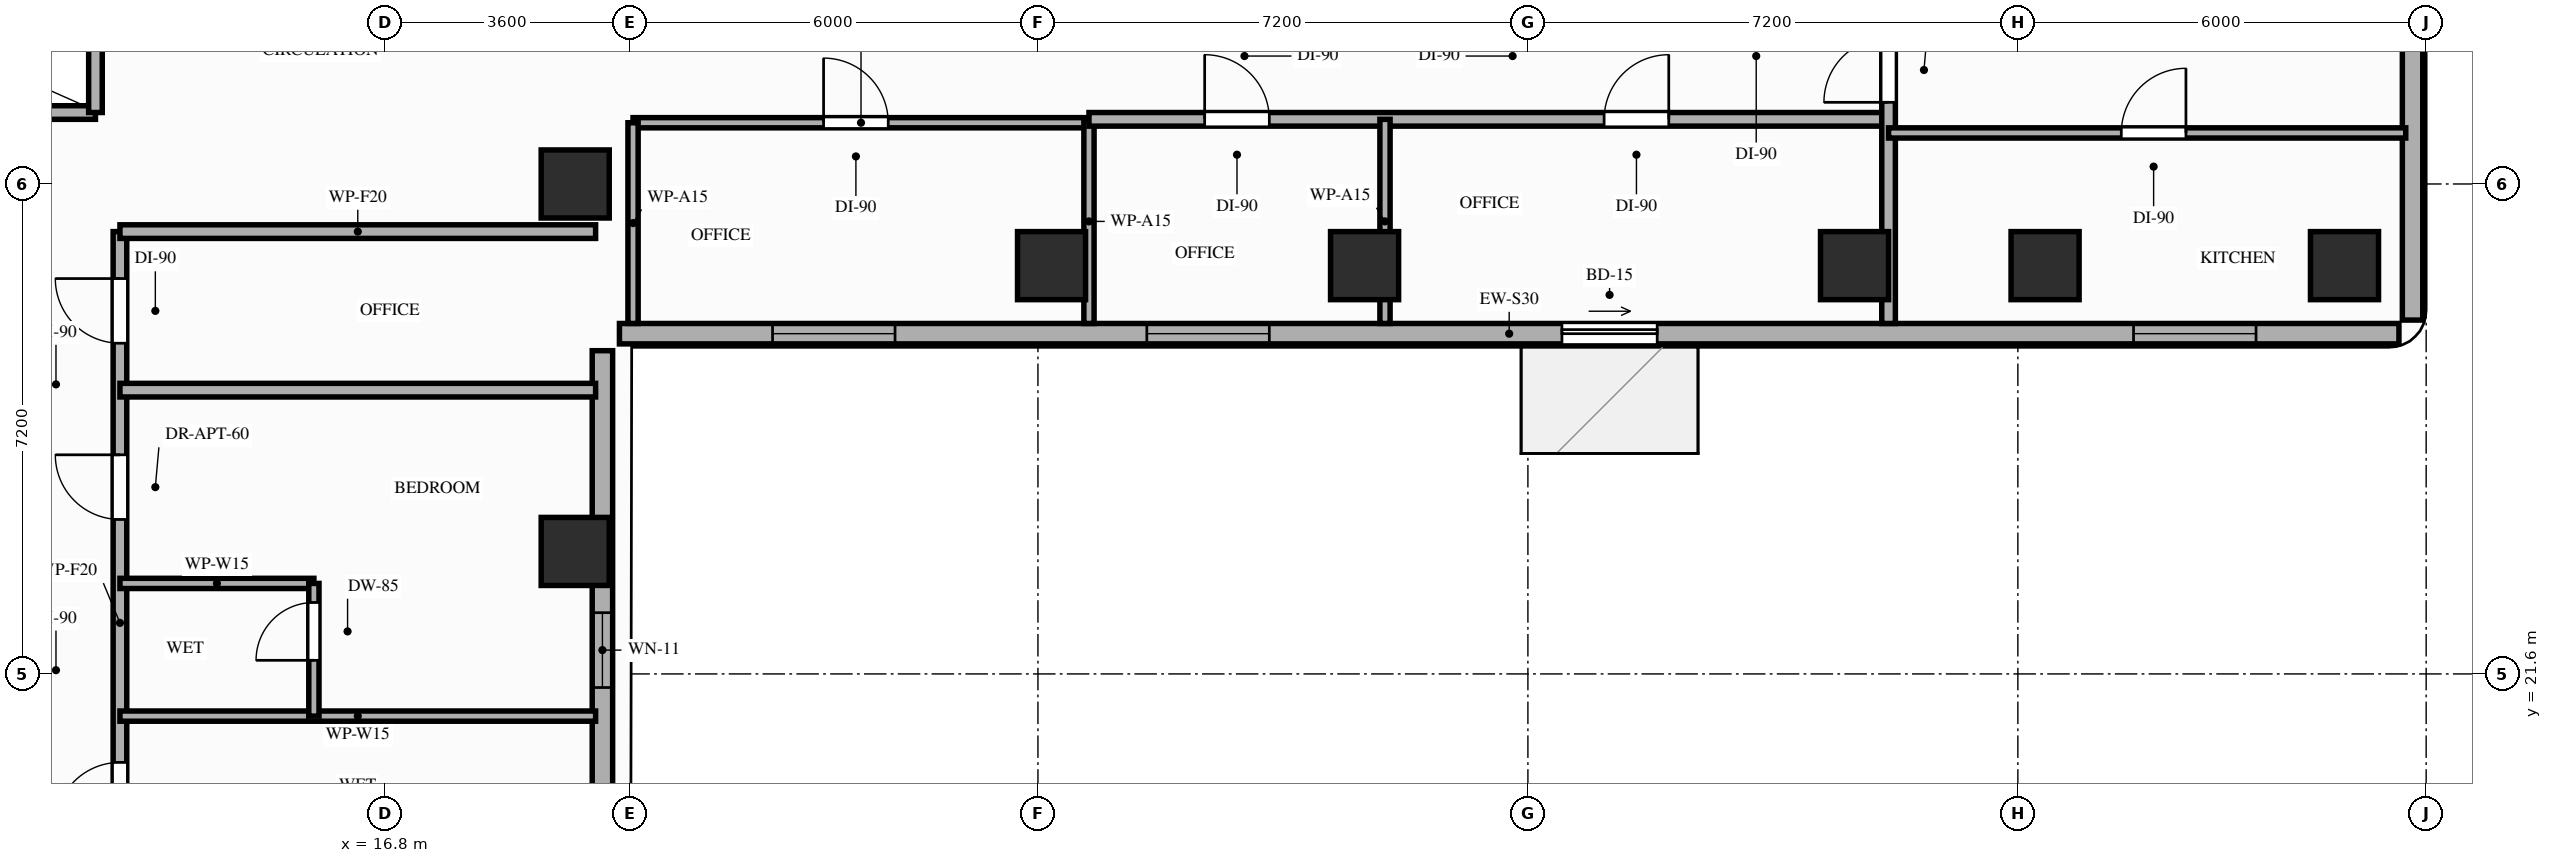
"""IFC4 building model, lengths in metres.
Left out: names, types, materials, properties, quantities, classifications, styles, units other than length and angle.
Written with IfcOpenShell. Run it as: python <this file> out.ifc"""

import sys

from ifc_helpers import new_model, si_unit, direction, frame, frame_2d, origin, origin_2d, place, context, subcontext, project, spatial, rectangle, extrude, element, fill, save


model = new_model("IFC4")
c1 = context("Model", 3, precision=1e-05, world=origin(), true_north=direction((0.0, 1.0)))
c2 = subcontext(c1, "Body", "Model", "MODEL_VIEW")
j1 = project(units=[si_unit("LENGTHUNIT", "METRE"), si_unit("PLANEANGLEUNIT", "RADIAN")], contexts=[c1])
p1 = place(None, origin())
s1 = spatial("IfcSite", under=j1, at=p1, CompositionType="ELEMENT")
p2 = place(p1, origin())
s2 = spatial("IfcBuilding", under=s1, at=p2, CompositionType="ELEMENT")
p3 = place(p2, frame((0.0, 0.0, 145.8)))
s3 = spatial("IfcBuildingStorey", under=s2, at=p3, CompositionType="ELEMENT", Elevation=145.8)
for number, where, z_axis, x_axis in (
    (1, (19.6, 23.4, 0.0), (0.0, 0.0, 1.0), (1.0, 0.0, 0.0)),
    (2, (19.6, 28.8, 0.0), (0.0, 0.0, 1.0), (1.0, 0.0, 0.0)),
    (3, (26.6, 27.6, 0.0), (0.0, 0.0, 1.0), (1.0, 0.0, 0.0)),
    (4, (31.2, 27.6, 0.0), (0.0, 0.0, 1.0), (1.0, 0.0, 0.0)),
    (5, (38.4, 27.6, 0.0), (0.0, 0.0, 1.0), (1.0, 0.0, 0.0)),
    (6, (41.2, 27.6, 0.0), (0.0, 0.0, 1.0), (1.0, 0.0, 0.0)),
    (7, (45.6, 27.6, 0.0), (0.0, 0.0, 1.0), (1.0, 0.0, 0.0)),
):
    element("IfcColumn", number, at=place(p3, frame(where, z_axis=z_axis, x_axis=x_axis)), inside=s3, PredefinedType="COLUMN", context=c2, shape_type="SweptSolid", body=[
        extrude(rectangle(XDim=1.0, YDim=1.0, at=origin_2d()), origin(), (0.0, 0.0, 1.0), 3.2),
    ])
p4 = place(p3, frame((20.0, 8.8, 0.0), z_axis=(0.0, 0.0, 1.0), x_axis=(0.0, 1.0, 0.0)))
e8 = element("IfcWall", 8, at=p4, inside=s3, PredefinedType="STANDARD", context=c2, shape_type="SweptSolid", body=[
    extrude(rectangle(XDim=17.55, YDim=0.3, at=frame_2d((8.775, 0.0))), origin(), (0.0, 0.0, 1.0), 2.45),
])
p5 = place(p4, frame((12.6, 0.0, 0.85)))
e9 = element("IfcOpeningElement", 9, at=p5, cuts=e8, PredefinedType="OPENING", context=c2, shape_type="SweptSolid", body=[
    extrude(rectangle(XDim=1.1, YDim=1.35, at=frame_2d((0.55, 0.675))), frame((0.0, 0.16, 0.0), z_axis=(0.0, -1.0, 0.0), x_axis=(1.0, 0.0, 0.0)), (0.0, 0.0, 1.0), 0.32),
])
p6 = place(p4, frame((5.6, 0.0, 0.85)))
e10 = element("IfcOpeningElement", 10, at=p6, cuts=e8, PredefinedType="OPENING", context=c2, shape_type="SweptSolid", body=[
    extrude(rectangle(XDim=1.8, YDim=1.35, at=frame_2d((0.9, 0.675))), frame((0.0, 0.16, 0.0), z_axis=(0.0, -1.0, 0.0), x_axis=(1.0, 0.0, 0.0)), (0.0, 0.0, 1.0), 0.32),
])
p7 = place(p3, frame((20.25, 26.6, 0.0), z_axis=(0.0, 0.0, 1.0), x_axis=(1.0, 0.0, 0.0)))
e11 = element("IfcWall", 11, at=p7, inside=s3, PredefinedType="STANDARD", context=c2, shape_type="SweptSolid", body=[
    extrude(rectangle(XDim=26.15, YDim=0.3, at=frame_2d((13.075, 0.0))), origin(), (0.0, 0.0, 1.0), 2.71),
])
p8 = place(p7, frame((13.85, 0.0, 0.0)))
e12 = element("IfcOpeningElement", 12, at=p8, cuts=e11, PredefinedType="OPENING", context=c2, shape_type="SweptSolid", body=[
    extrude(rectangle(XDim=1.4, YDim=2.1, at=frame_2d((0.7, 1.05))), frame((0.0, 0.16, 0.0), z_axis=(0.0, -1.0, 0.0), x_axis=(1.0, 0.0, 0.0)), (0.0, 0.0, 1.0), 0.32),
])
p9 = place(p7, frame((2.25, 0.0, 0.85)))
e13 = element("IfcOpeningElement", 13, at=p9, cuts=e11, PredefinedType="OPENING", context=c2, shape_type="SweptSolid", body=[
    extrude(rectangle(XDim=1.8, YDim=1.61, at=frame_2d((0.9, 0.805))), frame((0.0, 0.16, 0.0), z_axis=(0.0, -1.0, 0.0), x_axis=(1.0, 0.0, 0.0)), (0.0, 0.0, 1.0), 0.32),
])
p10 = place(p7, frame((7.75, 0.0, 0.85)))
e14 = element("IfcOpeningElement", 14, at=p10, cuts=e11, PredefinedType="OPENING", context=c2, shape_type="SweptSolid", body=[
    extrude(rectangle(XDim=1.8, YDim=1.61, at=frame_2d((0.9, 0.805))), frame((0.0, 0.16, 0.0), z_axis=(0.0, -1.0, 0.0), x_axis=(1.0, 0.0, 0.0)), (0.0, 0.0, 1.0), 0.32),
])
p11 = place(p7, frame((22.25, 0.0, 0.85)))
e15 = element("IfcOpeningElement", 15, at=p11, cuts=e11, PredefinedType="OPENING", context=c2, shape_type="SweptSolid", body=[
    extrude(rectangle(XDim=1.8, YDim=1.61, at=frame_2d((0.9, 0.805))), frame((0.0, 0.16, 0.0), z_axis=(0.0, -1.0, 0.0), x_axis=(1.0, 0.0, 0.0)), (0.0, 0.0, 1.0), 0.32),
])
p12 = place(p3, frame((46.6, 26.8, 0.0), z_axis=(0.0, 0.0, 1.0), x_axis=(0.0, 1.0, 0.0)))
e16 = element("IfcWall", 16, at=p12, inside=s3, PredefinedType="STANDARD", context=c2, shape_type="SweptSolid", body=[
    extrude(rectangle(XDim=15.35, YDim=0.3, at=frame_2d((7.675, 0.0))), origin(), (0.0, 0.0, 1.0), 3.02),
])
p13 = place(p12, frame((6.13, 0.0, 0.85)))
e17 = element("IfcOpeningElement", 17, at=p13, cuts=e16, PredefinedType="OPENING", context=c2, shape_type="SweptSolid", body=[
    extrude(rectangle(XDim=1.8, YDim=1.75, at=frame_2d((0.9, 0.875))), frame((0.0, 0.16, 0.0), z_axis=(0.0, -1.0, 0.0), x_axis=(1.0, 0.0, 0.0)), (0.0, 0.0, 1.0), 0.32),
])
p14 = place(p3, frame((7.0, 29.85, 0.0), z_axis=(0.0, 0.0, 1.0), x_axis=(1.0, 0.0, 0.0)))
e18 = element("IfcWall", 18, at=p14, inside=s3, PredefinedType="MOVABLE", context=c2, shape_type="SweptSolid", body=[
    extrude(rectangle(XDim=5.55, YDim=0.2, at=frame_2d((2.775, 0.0))), origin(), (0.0, 0.0, 1.0), 3.02),
])
p15 = place(p3, frame((12.55, 29.85, 0.0), z_axis=(0.0, 0.0, 1.0), x_axis=(0.0, 1.0, 0.0)))
e19 = element("IfcWall", 19, at=p15, inside=s3, PredefinedType="MOVABLE", context=c2, shape_type="SweptSolid", body=[
    extrude(rectangle(XDim=2.5, YDim=0.2, at=frame_2d((1.25, 0.0))), origin(), (0.0, 0.0, 1.0), 3.02),
])
p16 = place(p3, frame((12.91, 16.6, 0.0), z_axis=(0.0, 0.0, 1.0), x_axis=(0.0, 1.0, 0.0)))
e20 = element("IfcWall", 20, at=p16, inside=s3, PredefinedType="PARTITIONING", context=c2, shape_type="SweptSolid", body=[
    extrude(rectangle(XDim=11.5, YDim=0.2, at=frame_2d((5.75, 0.0))), origin(), (0.0, 0.0, 1.0), 2.45),
])
p17 = place(p16, frame((0.45, 0.0, 0.0)))
e21 = element("IfcOpeningElement", 21, at=p17, cuts=e20, PredefinedType="OPENING", context=c2, shape_type="SweptSolid", body=[
    extrude(rectangle(XDim=0.95, YDim=2.15, at=frame_2d((0.475, 1.075))), frame((0.0, 0.11, 0.0), z_axis=(0.0, -1.0, 0.0), x_axis=(1.0, 0.0, 0.0)), (0.0, 0.0, 1.0), 0.22),
])
p18 = place(p16, frame((2.75, 0.0, 0.0)))
e22 = element("IfcOpeningElement", 22, at=p18, cuts=e20, PredefinedType="OPENING", context=c2, shape_type="SweptSolid", body=[
    extrude(rectangle(XDim=0.95, YDim=2.1, at=frame_2d((0.475, 1.05))), frame((0.0, 0.11, 0.0), z_axis=(0.0, -1.0, 0.0), x_axis=(1.0, 0.0, 0.0)), (0.0, 0.0, 1.0), 0.22),
])
p19 = place(p16, frame((9.86, 0.0, 0.0)))
e23 = element("IfcOpeningElement", 23, at=p19, cuts=e20, PredefinedType="OPENING", context=c2, shape_type="SweptSolid", body=[
    extrude(rectangle(XDim=0.95, YDim=2.15, at=frame_2d((0.475, 1.075))), frame((0.0, 0.11, 0.0), z_axis=(0.0, -1.0, 0.0), x_axis=(1.0, 0.0, 0.0)), (0.0, 0.0, 1.0), 0.22),
])
p20 = place(p16, frame((7.27, 0.0, 0.0)))
e24 = element("IfcOpeningElement", 24, at=p20, cuts=e20, PredefinedType="OPENING", context=c2, shape_type="SweptSolid", body=[
    extrude(rectangle(XDim=0.95, YDim=2.15, at=frame_2d((0.475, 1.075))), frame((0.0, 0.11, 0.0), z_axis=(0.0, -1.0, 0.0), x_axis=(1.0, 0.0, 0.0)), (0.0, 0.0, 1.0), 0.22),
])
p21 = place(p3, frame((12.91, 28.1, 0.0), z_axis=(0.0, 0.0, 1.0), x_axis=(1.0, 0.0, 0.0)))
e25 = element("IfcWall", 25, at=p21, inside=s3, PredefinedType="PARTITIONING", context=c2, shape_type="SweptSolid", body=[
    extrude(rectangle(XDim=6.99, YDim=0.2, at=frame_2d((3.495, 0.0))), origin(), (0.0, 0.0, 1.0), 2.45),
])
p22 = place(p3, frame((20.45, 29.7, 0.0), z_axis=(0.0, 0.0, 1.0), x_axis=(1.0, 0.0, 0.0)))
e26 = element("IfcWall", 26, at=p22, inside=s3, PredefinedType="PARTITIONING", context=c2, shape_type="SweptSolid", body=[
    extrude(rectangle(XDim=6.7, YDim=0.15, at=frame_2d((3.35, 0.0))), origin(), (0.0, 0.0, 1.0), 3.02),
])
p23 = place(p22, frame((2.8, 0.0, 0.0)))
e27 = element("IfcOpeningElement", 27, at=p23, cuts=e26, PredefinedType="OPENING", context=c2, shape_type="SweptSolid", body=[
    extrude(rectangle(XDim=0.95, YDim=2.15, at=frame_2d((0.475, 1.075))), frame((0.0, 0.085, 0.0), z_axis=(0.0, -1.0, 0.0), x_axis=(1.0, 0.0, 0.0)), (0.0, 0.0, 1.0), 0.17),
])
p24 = place(p3, frame((20.45, 26.75, 0.0), z_axis=(0.0, 0.0, 1.0), x_axis=(0.0, 1.0, 0.0)))
e28 = element("IfcWall", 28, at=p24, inside=s3, PredefinedType="PARTITIONING", context=c2, shape_type="SweptSolid", body=[
    extrude(rectangle(XDim=2.95, YDim=0.15, at=frame_2d((1.475, 0.0))), origin(), (0.0, 0.0, 1.0), 2.45),
])
p25 = place(p3, frame((27.15, 26.75, 0.0), z_axis=(0.0, 0.0, 1.0), x_axis=(0.0, 1.0, 0.0)))
e29 = element("IfcWall", 29, at=p25, inside=s3, PredefinedType="PARTITIONING", context=c2, shape_type="SweptSolid", body=[
    extrude(rectangle(XDim=3.0, YDim=0.15, at=frame_2d((1.5, 0.0))), origin(), (0.0, 0.0, 1.0), 2.45),
])
p26 = place(p3, frame((12.91, 20.98, 0.0), z_axis=(0.0, 0.0, 1.0), x_axis=(1.0, 0.0, 0.0)))
e30 = element("IfcWall", 30, at=p26, inside=s3, PredefinedType="PARTITIONING", context=c2, shape_type="SweptSolid", body=[
    extrude(rectangle(XDim=6.99, YDim=0.15, at=frame_2d((3.495, 0.0))), origin(), (0.0, 0.0, 1.0), 2.45),
])
p27 = place(p3, frame((12.91, 25.77, 0.0), z_axis=(0.0, 0.0, 1.0), x_axis=(1.0, 0.0, 0.0)))
e31 = element("IfcWall", 31, at=p27, inside=s3, PredefinedType="PARTITIONING", context=c2, shape_type="SweptSolid", body=[
    extrude(rectangle(XDim=6.99, YDim=0.2, at=frame_2d((3.495, 0.0))), origin(), (0.0, 0.0, 1.0), 2.45),
])
p28 = place(p3, frame((12.91, 22.93, 0.0), z_axis=(0.0, 0.0, 1.0), x_axis=(1.0, 0.0, 0.0)))
e32 = element("IfcWall", 32, at=p28, inside=s3, PredefinedType="PARTITIONING", context=c2, shape_type="SweptSolid", body=[
    extrude(rectangle(XDim=2.85, YDim=0.15, at=frame_2d((1.425, 0.0))), origin(), (0.0, 0.0, 1.0), 3.02),
])
p29 = place(p3, frame((15.76, 20.98, 0.0), z_axis=(0.0, 0.0, 1.0), x_axis=(0.0, 1.0, 0.0)))
e33 = element("IfcWall", 33, at=p29, inside=s3, PredefinedType="PARTITIONING", context=c2, shape_type="SweptSolid", body=[
    extrude(rectangle(XDim=1.95, YDim=0.15, at=frame_2d((0.975, 0.0))), origin(), (0.0, 0.0, 1.0), 3.02),
])
p30 = place(p29, frame((0.82, 0.0, 0.0)))
e34 = element("IfcOpeningElement", 34, at=p30, cuts=e33, PredefinedType="OPENING", context=c2, shape_type="SweptSolid", body=[
    extrude(rectangle(XDim=0.85, YDim=2.1, at=frame_2d((0.425, 1.05))), frame((0.0, 0.085, 0.0), z_axis=(0.0, -1.0, 0.0), x_axis=(1.0, 0.0, 0.0)), (0.0, 0.0, 1.0), 0.17),
])
p31 = place(p3, frame((27.15, 29.75, 0.0), z_axis=(0.0, 0.0, 1.0), x_axis=(1.0, 0.0, 0.0)))
e35 = element("IfcWall", 35, at=p31, inside=s3, PredefinedType="PARTITIONING", context=c2, shape_type="SweptSolid", body=[
    extrude(rectangle(XDim=11.75, YDim=0.2, at=frame_2d((5.875, 0.0))), origin(), (0.0, 0.0, 1.0), 2.45),
])
p32 = place(p31, frame((1.7, 0.0, 0.0)))
e36 = element("IfcOpeningElement", 36, at=p32, cuts=e35, PredefinedType="OPENING", context=c2, shape_type="SweptSolid", body=[
    extrude(rectangle(XDim=0.95, YDim=2.15, at=frame_2d((0.475, 1.075))), frame((0.0, 0.11, 0.0), z_axis=(0.0, -1.0, 0.0), x_axis=(1.0, 0.0, 0.0)), (0.0, 0.0, 1.0), 0.22),
])
p33 = place(p31, frame((7.57, 0.0, 0.0)))
e37 = element("IfcOpeningElement", 37, at=p33, cuts=e35, PredefinedType="OPENING", context=c2, shape_type="SweptSolid", body=[
    extrude(rectangle(XDim=0.95, YDim=2.15, at=frame_2d((0.475, 1.075))), frame((0.0, 0.11, 0.0), z_axis=(0.0, -1.0, 0.0), x_axis=(1.0, 0.0, 0.0)), (0.0, 0.0, 1.0), 0.22),
])
p34 = place(p3, frame((38.9, 26.75, 0.0), z_axis=(0.0, 0.0, 1.0), x_axis=(0.0, 1.0, 0.0)))
e38 = element("IfcWall", 38, at=p34, inside=s3, PredefinedType="PARTITIONING", context=c2, shape_type="SweptSolid", body=[
    extrude(rectangle(XDim=15.45, YDim=0.2, at=frame_2d((7.725, 0.0))), origin(), (0.0, 0.0, 1.0), 2.45),
])
p35 = place(p34, frame((3.25, 0.0, 0.0)))
e39 = element("IfcOpeningElement", 39, at=p35, cuts=e38, PredefinedType="OPENING", context=c2, shape_type="SweptSolid", body=[
    extrude(rectangle(XDim=0.95, YDim=2.15, at=frame_2d((0.475, 1.075))), frame((0.0, 0.11, 0.0), z_axis=(0.0, -1.0, 0.0), x_axis=(1.0, 0.0, 0.0)), (0.0, 0.0, 1.0), 0.22),
])
p36 = place(p3, frame((38.9, 29.55, 0.0), z_axis=(0.0, 0.0, 1.0), x_axis=(1.0, 0.0, 0.0)))
e40 = element("IfcWall", 40, at=p36, inside=s3, PredefinedType="PARTITIONING", context=c2, shape_type="SweptSolid", body=[
    extrude(rectangle(XDim=7.6, YDim=0.15, at=frame_2d((3.8, 0.0))), origin(), (0.0, 0.0, 1.0), 2.45),
])
p37 = place(p36, frame((3.42, 0.0, 0.0)))
e41 = element("IfcOpeningElement", 41, at=p37, cuts=e40, PredefinedType="OPENING", context=c2, shape_type="SweptSolid", body=[
    extrude(rectangle(XDim=0.95, YDim=2.15, at=frame_2d((0.475, 1.075))), frame((0.0, 0.085, 0.0), z_axis=(0.0, -1.0, 0.0), x_axis=(1.0, 0.0, 0.0)), (0.0, 0.0, 1.0), 0.17),
])
p38 = place(p3, frame((31.5, 26.75, 0.0), z_axis=(0.0, 0.0, 1.0), x_axis=(0.0, 1.0, 0.0)))
e42 = element("IfcWall", 42, at=p38, inside=s3, PredefinedType="PARTITIONING", context=c2, shape_type="SweptSolid", body=[
    extrude(rectangle(XDim=3.0, YDim=0.15, at=frame_2d((1.5, 0.0))), origin(), (0.0, 0.0, 1.0), 2.45),
])
p39 = place(p8, origin())
e43 = element("IfcDoor", 43, at=p39, inside=s3, OperationType="SLIDING_TO_RIGHT", PredefinedType="DOOR", context=c2, shape_type="SweptSolid", body=[
    extrude(rectangle(XDim=1.4, YDim=2.1, at=frame_2d((0.7, 1.05))), frame((0.0, 0.025, 0.0), z_axis=(0.0, -1.0, 0.0), x_axis=(1.0, 0.0, 0.0)), (0.0, 0.0, 1.0), 0.05),
])
fill(e12, e43)
p40 = place(p5, origin())
e44 = element("IfcWindow", 44, at=p40, inside=s3, PartitioningType="SINGLE_PANEL", PredefinedType="WINDOW", context=c2, shape_type="SweptSolid", body=[
    extrude(rectangle(XDim=1.1, YDim=1.35, at=frame_2d((0.55, 0.675))), frame((0.0, 0.03, 0.0), z_axis=(0.0, -1.0, 0.0), x_axis=(1.0, 0.0, 0.0)), (0.0, 0.0, 1.0), 0.06),
])
fill(e9, e44)
p41 = place(p9, origin())
e45 = element("IfcWindow", 45, at=p41, inside=s3, PartitioningType="SINGLE_PANEL", PredefinedType="WINDOW", context=c2, shape_type="SweptSolid", body=[
    extrude(rectangle(XDim=1.8, YDim=1.61, at=frame_2d((0.9, 0.805))), frame((0.0, 0.03, 0.0), z_axis=(0.0, -1.0, 0.0), x_axis=(1.0, 0.0, 0.0)), (0.0, 0.0, 1.0), 0.06),
])
fill(e13, e45)
p42 = place(p10, origin())
e46 = element("IfcWindow", 46, at=p42, inside=s3, PartitioningType="SINGLE_PANEL", PredefinedType="WINDOW", context=c2, shape_type="SweptSolid", body=[
    extrude(rectangle(XDim=1.8, YDim=1.61, at=frame_2d((0.9, 0.805))), frame((0.0, 0.03, 0.0), z_axis=(0.0, -1.0, 0.0), x_axis=(1.0, 0.0, 0.0)), (0.0, 0.0, 1.0), 0.06),
])
fill(e14, e46)
p43 = place(p11, origin())
e47 = element("IfcWindow", 47, at=p43, inside=s3, PartitioningType="SINGLE_PANEL", PredefinedType="WINDOW", context=c2, shape_type="SweptSolid", body=[
    extrude(rectangle(XDim=1.8, YDim=1.61, at=frame_2d((0.9, 0.805))), frame((0.0, 0.03, 0.0), z_axis=(0.0, -1.0, 0.0), x_axis=(1.0, 0.0, 0.0)), (0.0, 0.0, 1.0), 0.06),
])
fill(e15, e47)
p44 = place(p23, origin())
e48 = element("IfcDoor", 48, at=p44, inside=s3, OperationType="SINGLE_SWING_LEFT", PredefinedType="DOOR", context=c2, shape_type="SweptSolid", body=[
    extrude(rectangle(XDim=0.95, YDim=2.15, at=frame_2d((0.475, 1.075))), frame((0.0, 0.025, 0.0), z_axis=(0.0, -1.0, 0.0), x_axis=(1.0, 0.0, 0.0)), (0.0, 0.0, 1.0), 0.05),
])
fill(e27, e48)
p45 = place(p18, origin())
e49 = element("IfcDoor", 49, at=p45, inside=s3, OperationType="SINGLE_SWING_LEFT", PredefinedType="DOOR", context=c2, shape_type="SweptSolid", body=[
    extrude(rectangle(XDim=0.95, YDim=2.1, at=frame_2d((0.475, 1.05))), frame((0.0, 0.025, 0.0), z_axis=(0.0, -1.0, 0.0), x_axis=(1.0, 0.0, 0.0)), (0.0, 0.0, 1.0), 0.05),
])
fill(e22, e49)
p46 = place(p19, origin())
e50 = element("IfcDoor", 50, at=p46, inside=s3, OperationType="SINGLE_SWING_RIGHT", PredefinedType="DOOR", context=c2, shape_type="SweptSolid", body=[
    extrude(rectangle(XDim=0.95, YDim=2.15, at=frame_2d((0.475, 1.075))), frame((0.0, 0.025, 0.0), z_axis=(0.0, -1.0, 0.0), x_axis=(1.0, 0.0, 0.0)), (0.0, 0.0, 1.0), 0.05),
])
fill(e23, e50)
p47 = place(p30, origin())
e51 = element("IfcDoor", 51, at=p47, inside=s3, OperationType="SINGLE_SWING_LEFT", PredefinedType="DOOR", context=c2, shape_type="SweptSolid", body=[
    extrude(rectangle(XDim=0.85, YDim=2.1, at=frame_2d((0.425, 1.05))), frame((0.0, 0.025, 0.0), z_axis=(0.0, -1.0, 0.0), x_axis=(1.0, 0.0, 0.0)), (0.0, 0.0, 1.0), 0.05),
])
fill(e34, e51)
p48 = place(p20, origin())
e52 = element("IfcDoor", 52, at=p48, inside=s3, OperationType="SINGLE_SWING_RIGHT", PredefinedType="DOOR", context=c2, shape_type="SweptSolid", body=[
    extrude(rectangle(XDim=0.95, YDim=2.15, at=frame_2d((0.475, 1.075))), frame((0.0, 0.025, 0.0), z_axis=(0.0, -1.0, 0.0), x_axis=(1.0, 0.0, 0.0)), (0.0, 0.0, 1.0), 0.05),
])
fill(e24, e52)
p49 = place(p35, origin())
e53 = element("IfcDoor", 53, at=p49, inside=s3, OperationType="SINGLE_SWING_LEFT", PredefinedType="DOOR", context=c2, shape_type="SweptSolid", body=[
    extrude(rectangle(XDim=0.95, YDim=2.15, at=frame_2d((0.475, 1.075))), frame((0.0, 0.025, 0.0), z_axis=(0.0, -1.0, 0.0), x_axis=(1.0, 0.0, 0.0)), (0.0, 0.0, 1.0), 0.05),
])
fill(e39, e53)
p50 = place(p37, origin())
e54 = element("IfcDoor", 54, at=p50, inside=s3, OperationType="SINGLE_SWING_RIGHT", PredefinedType="DOOR", context=c2, shape_type="SweptSolid", body=[
    extrude(rectangle(XDim=0.95, YDim=2.15, at=frame_2d((0.475, 1.075))), frame((0.0, 0.025, 0.0), z_axis=(0.0, -1.0, 0.0), x_axis=(1.0, 0.0, 0.0)), (0.0, 0.0, 1.0), 0.05),
])
fill(e41, e54)
p51 = place(p32, origin())
e55 = element("IfcDoor", 55, at=p51, inside=s3, OperationType="SINGLE_SWING_LEFT", PredefinedType="DOOR", context=c2, shape_type="SweptSolid", body=[
    extrude(rectangle(XDim=0.95, YDim=2.15, at=frame_2d((0.475, 1.075))), frame((0.0, 0.025, 0.0), z_axis=(0.0, -1.0, 0.0), x_axis=(1.0, 0.0, 0.0)), (0.0, 0.0, 1.0), 0.05),
])
fill(e36, e55)
p52 = place(p33, origin())
e56 = element("IfcDoor", 56, at=p52, inside=s3, OperationType="SINGLE_SWING_RIGHT", PredefinedType="DOOR", context=c2, shape_type="SweptSolid", body=[
    extrude(rectangle(XDim=0.95, YDim=2.15, at=frame_2d((0.475, 1.075))), frame((0.0, 0.025, 0.0), z_axis=(0.0, -1.0, 0.0), x_axis=(1.0, 0.0, 0.0)), (0.0, 0.0, 1.0), 0.05),
])
fill(e37, e56)
save(model, sys.argv[1])
